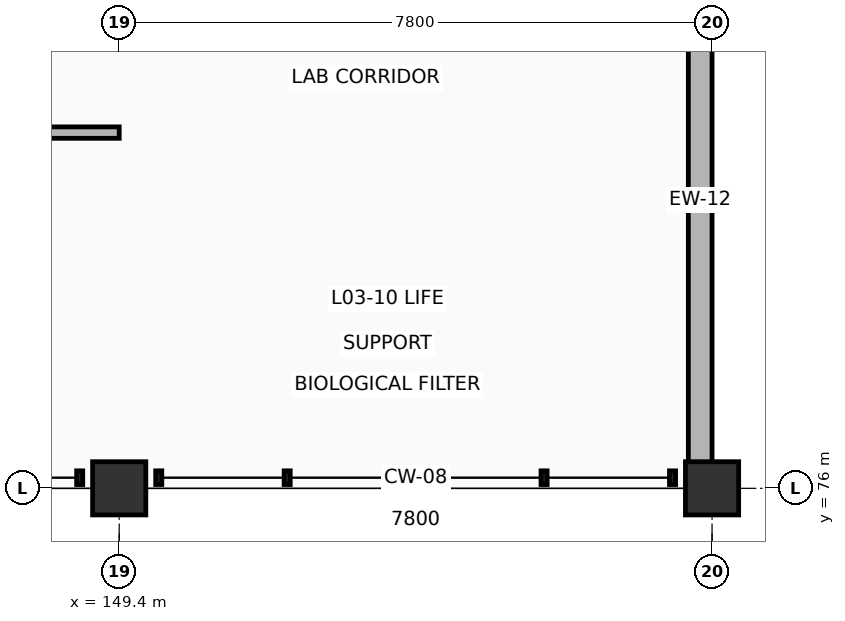
"""IFC4 building model, lengths in metres.
Left out: names, types, materials, properties, quantities, classifications, styles, units other than length and angle.
Written with IfcOpenShell. Run it as: python <this file> out.ifc"""

import sys

from ifc_helpers import new_model, si_unit, direction, frame, frame_2d, origin, origin_2d, place, context, subcontext, project, spatial, rectangle, extrude, element, save


model = new_model("IFC4")
c1 = context("Model", 3, precision=1e-05, world=origin(), true_north=direction((0.0, 1.0)))
c2 = subcontext(c1, "Body", "Model", "MODEL_VIEW")
j1 = project(units=[si_unit("LENGTHUNIT", "METRE"), si_unit("PLANEANGLEUNIT", "RADIAN")], contexts=[c1])
p1 = place(None, origin())
s1 = spatial("IfcSite", under=j1, at=p1, CompositionType="ELEMENT")
p2 = place(p1, origin())
s2 = spatial("IfcBuilding", under=s1, at=p2, CompositionType="ELEMENT")
p3 = place(p2, frame((0.0, 0.0, 10.5)))
s3 = spatial("IfcBuildingStorey", under=s2, at=p3, CompositionType="ELEMENT", Elevation=10.5)
for number, where, z_axis, x_axis in (
    (1, (149.4, 76.0, 0.0), (0.0, 0.0, 1.0), (1.0, 0.0, 0.0)),
    (2, (157.2, 76.0, 0.0), (0.0, 0.0, 1.0), (1.0, 0.0, 0.0)),
):
    element("IfcColumn", number, at=place(p3, frame(where, z_axis=z_axis, x_axis=x_axis)), inside=s3, PredefinedType="COLUMN", context=c2, shape_type="SweptSolid", body=[
        extrude(rectangle(XDim=0.7, YDim=0.7, at=origin_2d()), origin(), (0.0, 0.0, 1.0), 4.8),
    ])
p4 = place(p3, frame((157.044, 83.24, 0.0), z_axis=(0.0, 0.0, 1.0), x_axis=(0.0, -1.0, 0.0)))
e3 = element("IfcWall", 3, at=p4, inside=s3, PredefinedType="SOLIDWALL", context=c2, shape_type="SweptSolid", body=[
    extrude(rectangle(XDim=6.905, YDim=0.312, at=frame_2d((3.453, 0.0))), origin(), (0.0, 0.0, 1.0), 3.991),
])
p5 = place(p3, frame((141.6, 80.68, 0.0), z_axis=(0.0, 0.0, 1.0), x_axis=(1.0, 0.0, 0.0)))
e4 = element("IfcWall", 4, at=p5, inside=s3, PredefinedType="PARTITIONING", context=c2, shape_type="SweptSolid", body=[
    extrude(rectangle(XDim=7.8, YDim=0.15, at=frame_2d((3.9, 0.0))), origin(), (0.0, 0.0, 1.0), 3.991),
])
p6 = place(p5, frame((3.4, 0.0, 0.0)))
e5 = element("IfcOpeningElement", 5, at=p6, cuts=e4, PredefinedType="OPENING", context=c2, shape_type="SweptSolid", body=[
    extrude(rectangle(XDim=1.0, YDim=2.15, at=frame_2d((0.5, 1.075))), frame((0.0, 0.085, 0.0), z_axis=(0.0, -1.0, 0.0), x_axis=(1.0, 0.0, 0.0)), (0.0, 0.0, 1.0), 0.17),
])
save(model, sys.argv[1])
